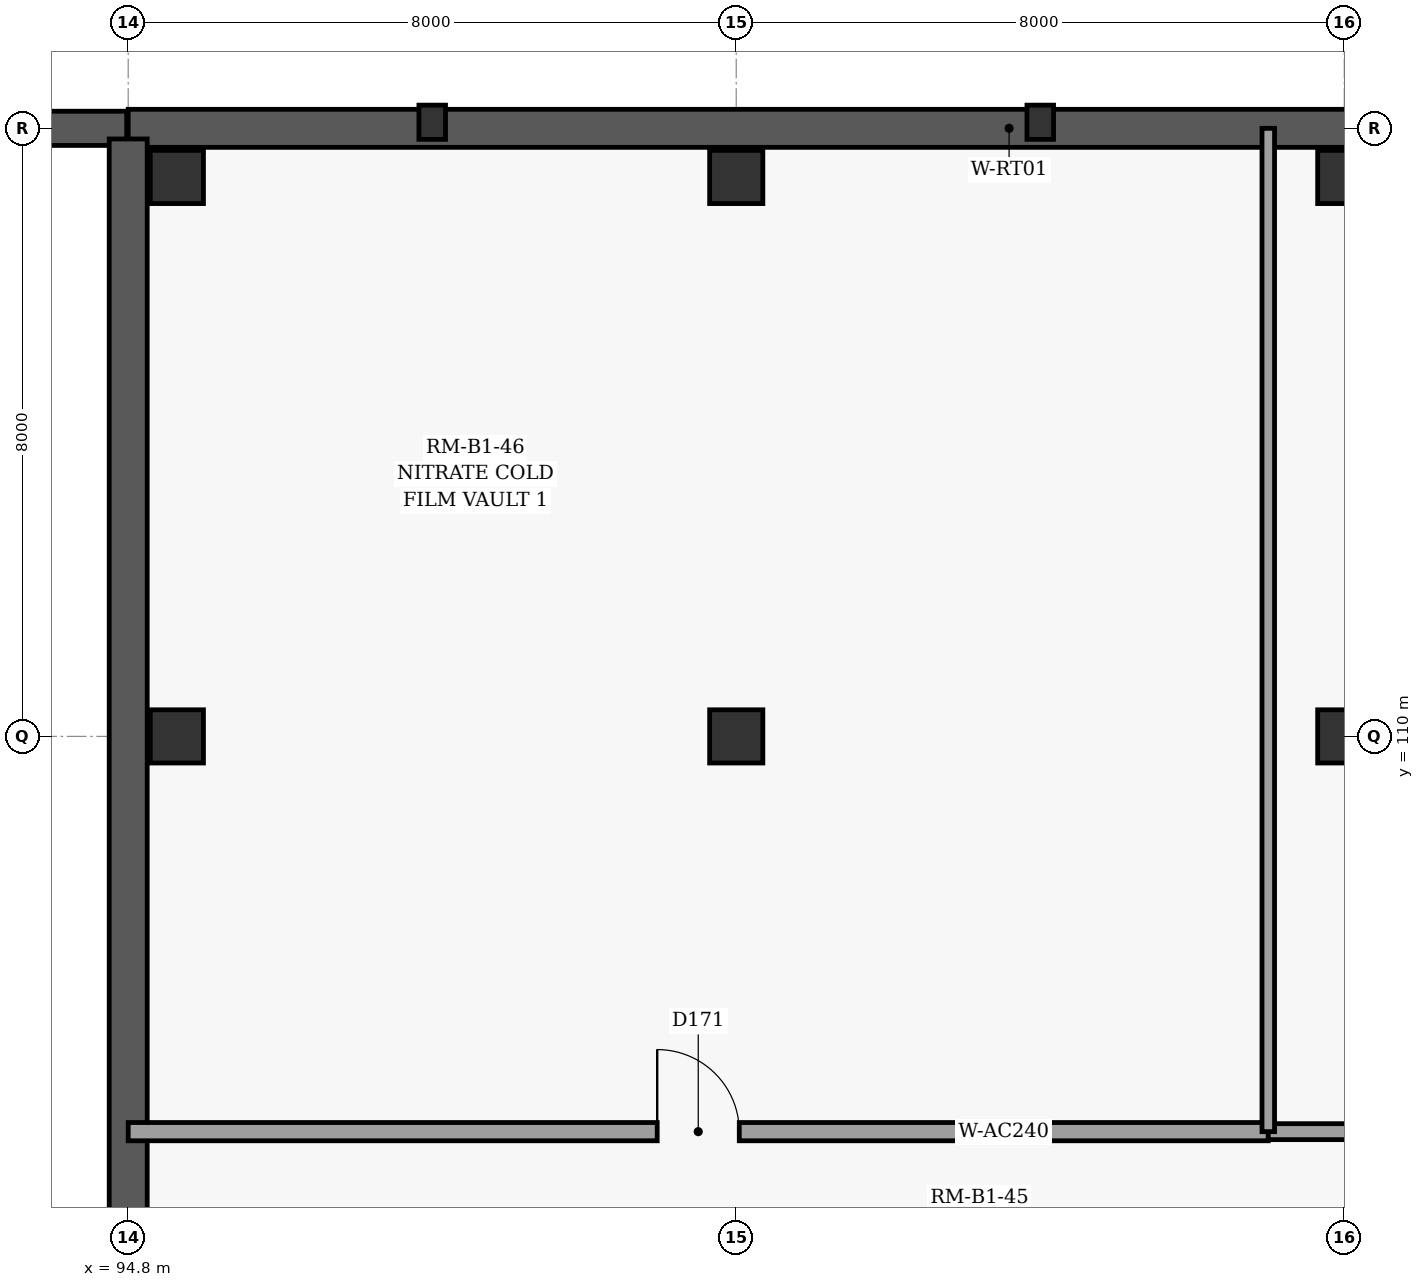
"""IFC4 building model, lengths in metres.
Left out: names, types, materials, properties, quantities, classifications, styles, units other than length and angle.
Written with IfcOpenShell. Run it as: python <this file> out.ifc"""

import sys

from ifc_helpers import new_model, si_unit, direction, frame, frame_2d, origin, origin_2d, place, context, subcontext, project, spatial, rectangle, extrude, element, fill, save


model = new_model("IFC4")
c1 = context("Model", 3, precision=1e-05, world=origin(), true_north=direction((0.0, 1.0)))
c2 = subcontext(c1, "Body", "Model", "MODEL_VIEW")
j1 = project(units=[si_unit("LENGTHUNIT", "METRE"), si_unit("PLANEANGLEUNIT", "RADIAN")], contexts=[c1])
p1 = place(None, origin())
s1 = spatial("IfcSite", under=j1, at=p1, CompositionType="ELEMENT")
p2 = place(p1, origin())
s2 = spatial("IfcBuilding", under=s1, at=p2, CompositionType="ELEMENT")
p3 = place(p2, frame((0.0, 0.0, -4.8)))
s3 = spatial("IfcBuildingStorey", under=s2, at=p3, CompositionType="ELEMENT", Elevation=-4.8)
for number, where, z_axis, x_axis in (
    (1, (95.44, 110.0, 0.0), (0.0, 0.0, 1.0), (1.0, 0.0, 0.0)),
    (2, (95.44, 117.36, 0.0), (0.0, 0.0, 1.0), (1.0, 0.0, 0.0)),
    (3, (102.8, 110.0, 0.0), (0.0, 0.0, 1.0), (1.0, 0.0, 0.0)),
    (4, (102.8, 117.36, 0.0), (0.0, 0.0, 1.0), (1.0, 0.0, 0.0)),
    (5, (110.8, 110.0, 0.0), (0.0, 0.0, 1.0), (1.0, 0.0, 0.0)),
    (6, (110.8, 117.36, 0.0), (0.0, 0.0, 1.0), (1.0, 0.0, 0.0)),
):
    element("IfcColumn", number, at=place(p3, frame(where, z_axis=z_axis, x_axis=x_axis)), inside=s3, PredefinedType="COLUMN", context=c2, shape_type="SweptSolid", body=[
        extrude(rectangle(XDim=0.7, YDim=0.7, at=origin_2d()), origin(), (0.0, 0.0, 1.0), 4.8),
    ])
for number, where, z_axis, x_axis in (
    (7, (98.8, 118.08, -0.5), (0.0, 0.0, 1.0), (0.0, 1.0, 0.0)),
    (8, (106.8, 118.08, -0.5), (0.0, 0.0, 1.0), (0.0, 1.0, 0.0)),
):
    element("IfcColumn", number, at=place(p3, frame(where, z_axis=z_axis, x_axis=x_axis)), inside=s3, PredefinedType="PILASTER", context=c2, shape_type="SweptSolid", body=[
        extrude(rectangle(XDim=0.35, YDim=0.45, at=origin_2d()), origin(), (0.0, 0.0, 1.0), 5.3),
    ])
p4 = place(p3, frame((46.02, 118.0, 0.0), z_axis=(0.0, 0.0, 1.0), x_axis=(1.0, 0.0, 0.0)))
e9 = element("IfcWall", 9, at=p4, inside=s3, PredefinedType="USERDEFINED", context=c2, shape_type="SweptSolid", body=[
    extrude(rectangle(XDim=48.76, YDim=0.45, at=frame_2d((24.38, 0.0))), origin(), (0.0, 0.0, 1.0), 4.53),
])
p5 = place(p3, frame((94.8, 118.0, 0.0), z_axis=(0.0, 0.0, 1.0), x_axis=(1.0, 0.0, 0.0)))
e10 = element("IfcWall", 10, at=p5, inside=s3, PredefinedType="USERDEFINED", context=c2, shape_type="SweptSolid", body=[
    extrude(rectangle(XDim=44.7, YDim=0.5, at=frame_2d((22.35, 0.0))), origin(), (0.0, 0.0, 1.0), 4.45),
])
p6 = place(p3, frame((94.8, 102.14, 0.0), z_axis=(0.0, 0.0, 1.0), x_axis=(0.0, 1.0, 0.0)))
e11 = element("IfcWall", 11, at=p6, inside=s3, PredefinedType="USERDEFINED", context=c2, shape_type="SweptSolid", body=[
    extrude(rectangle(XDim=15.72, YDim=0.5, at=frame_2d((7.86, 0.0))), origin(), (0.0, 0.0, 1.0), 4.45),
])
p7 = place(p3, frame((94.8, 104.8, 0.0), z_axis=(0.0, 0.0, 1.0), x_axis=(1.0, 0.0, 0.0)))
e12 = element("IfcWall", 12, at=p7, inside=s3, PredefinedType="PARTITIONING", context=c2, shape_type="SweptSolid", body=[
    extrude(rectangle(XDim=15.0, YDim=0.24, at=frame_2d((7.5, 0.0))), origin(), (0.0, 0.0, 1.0), 4.45),
])
p8 = place(p7, frame((6.96, 0.0, 0.0)))
e13 = element("IfcOpeningElement", 13, at=p8, cuts=e12, PredefinedType="OPENING", context=c2, shape_type="SweptSolid", body=[
    extrude(rectangle(XDim=1.08, YDim=2.15, at=frame_2d((0.54, 1.075))), frame((0.0, 0.13, 0.0), z_axis=(0.0, -1.0, 0.0), x_axis=(1.0, 0.0, 0.0)), (0.0, 0.0, 1.0), 0.26),
])
p9 = place(p3, frame((109.8, 104.8, 0.0), z_axis=(0.0, 0.0, 1.0), x_axis=(1.0, 0.0, 0.0)))
e14 = element("IfcWall", 14, at=p9, inside=s3, PredefinedType="PARTITIONING", context=c2, shape_type="SweptSolid", body=[
    extrude(rectangle(XDim=15.0, YDim=0.21, at=frame_2d((7.5, 0.0))), origin(), (0.0, 0.0, 1.0), 4.45),
])
p10 = place(p9, frame((6.94, 0.0, 0.0)))
e15 = element("IfcOpeningElement", 15, at=p10, cuts=e14, PredefinedType="OPENING", context=c2, shape_type="SweptSolid", body=[
    extrude(rectangle(XDim=1.12, YDim=2.15, at=frame_2d((0.56, 1.075))), frame((0.0, 0.115, 0.0), z_axis=(0.0, -1.0, 0.0), x_axis=(1.0, 0.0, 0.0)), (0.0, 0.0, 1.0), 0.23),
])
p11 = place(p3, frame((109.8, 118.0, 0.0), z_axis=(0.0, 0.0, 1.0), x_axis=(0.0, -1.0, 0.0)))
e16 = element("IfcWall", 16, at=p11, inside=s3, PredefinedType="PARTITIONING", context=c2, shape_type="SweptSolid", body=[
    extrude(rectangle(XDim=13.2, YDim=0.165, at=frame_2d((6.6, 0.0))), origin(), (0.0, 0.0, 1.0), 4.45),
])
p12 = place(p8, origin())
e17 = element("IfcDoor", 17, at=p12, inside=s3, OperationType="SINGLE_SWING_LEFT", PredefinedType="DOOR", context=c2, shape_type="SweptSolid", body=[
    extrude(rectangle(XDim=1.08, YDim=2.15, at=frame_2d((0.54, 1.075))), frame((0.0, 0.025, 0.0), z_axis=(0.0, -1.0, 0.0), x_axis=(1.0, 0.0, 0.0)), (0.0, 0.0, 1.0), 0.05),
])
fill(e13, e17)
save(model, sys.argv[1])
